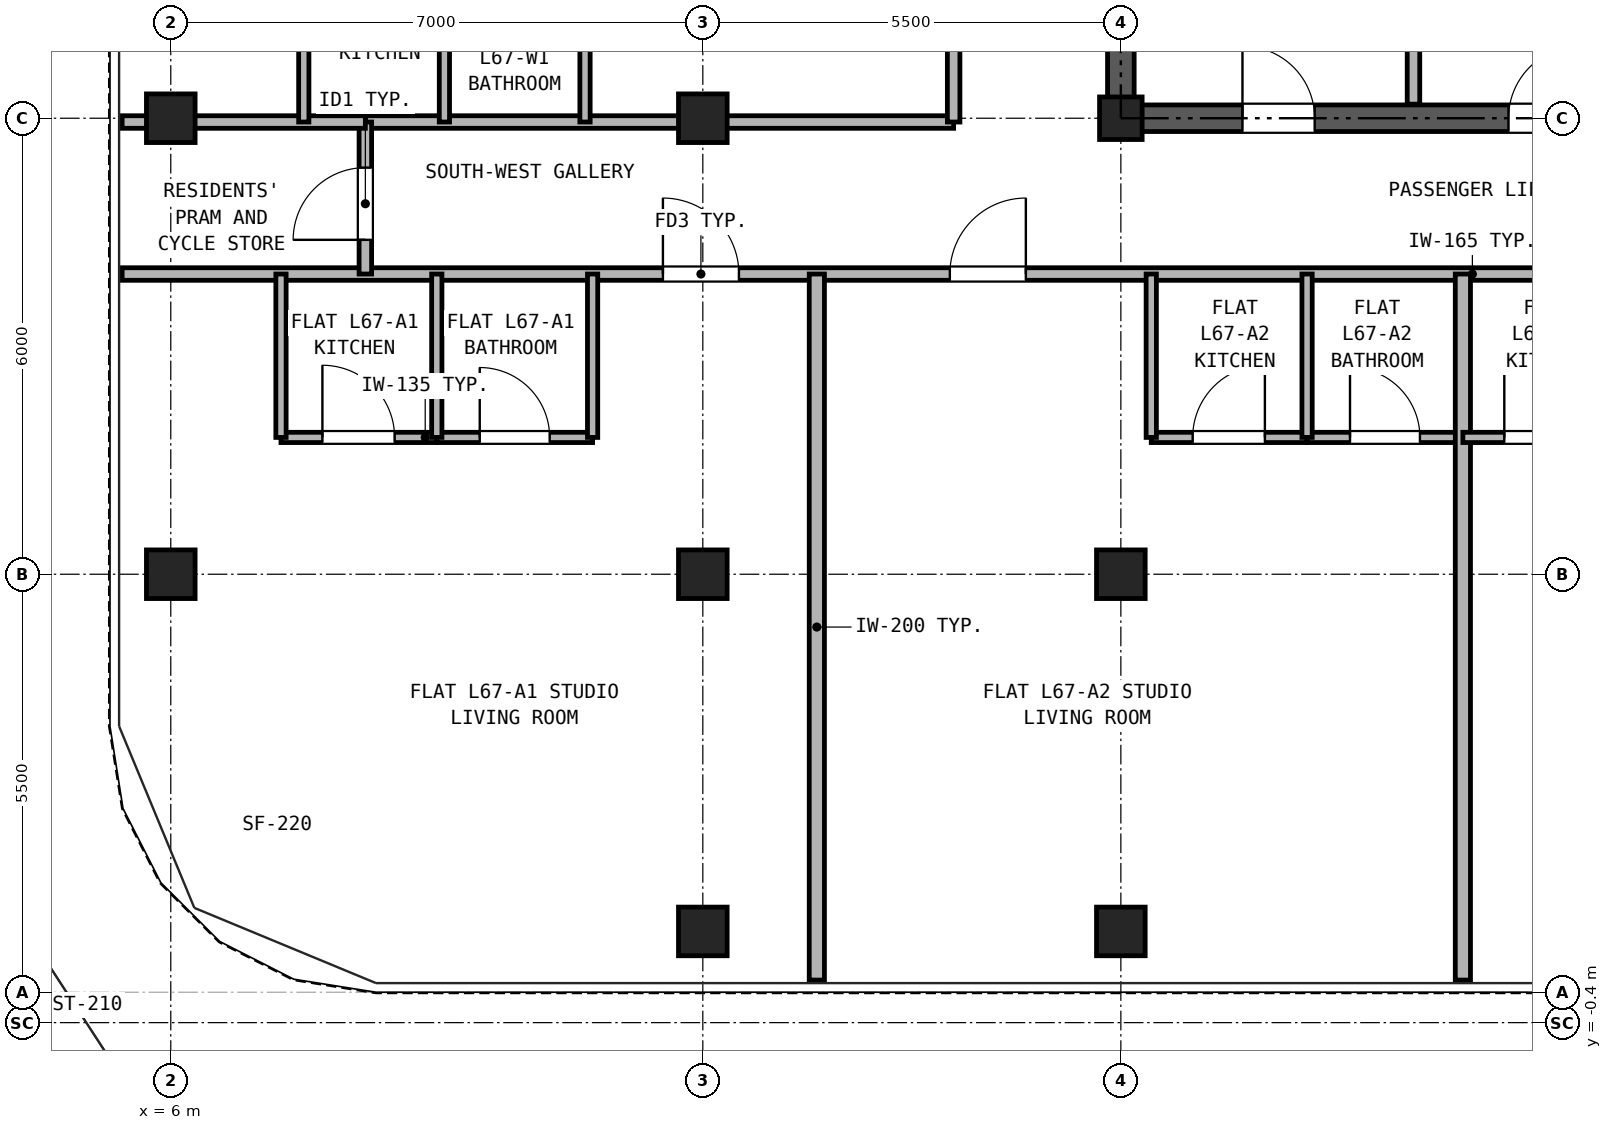
"""IFC4 building model, lengths in metres.
Left out: names, types, materials, properties, quantities, classifications, styles, units other than length and angle.
Written with IfcOpenShell. Run it as: python <this file> out.ifc"""

import sys

from ifc_helpers import new_model, si_unit, direction, frame, frame_2d, origin, origin_2d, place, context, subcontext, project, spatial, rectangle, hollow_rectangle, extrude, source, transform, mapped, element, fill, save


model = new_model("IFC4")
c1 = context("Model", 3, precision=1e-05, world=origin(), true_north=direction((0.0, 1.0)))
c2 = subcontext(c1, "Body", "Model", "MODEL_VIEW")
j1 = project(units=[si_unit("LENGTHUNIT", "METRE"), si_unit("PLANEANGLEUNIT", "RADIAN")], contexts=[c1])
p1 = place(None, origin())
s1 = spatial("IfcSite", under=j1, at=p1, CompositionType="ELEMENT")
p2 = place(p1, origin())
s2 = spatial("IfcBuilding", under=s1, at=p2, CompositionType="ELEMENT")
p3 = place(p2, frame((0.0, 0.0, 236.1)))
s3 = spatial("IfcBuildingStorey", under=s2, at=p3, CompositionType="ELEMENT", Elevation=236.1)
m1 = source(origin(), c2, "Body", "SweptSolid", [
    extrude(hollow_rectangle(XDim=0.64, YDim=0.64, WallThickness=0.035, at=origin_2d()), origin(), (0.0, 0.0, 1.0), 2.98),
])
for number, where, z_axis, x_axis in (
    (1, (13.0, 0.8, 0.0), (0.0, 0.0, 1.0), (1.0, 0.0, 0.0)),
    (2, (18.5, 0.8, 0.0), (0.0, 0.0, 1.0), (1.0, 0.0, 0.0)),
    (3, (6.0, 5.5, 0.0), (0.0, 0.0, 1.0), (1.0, 0.0, 0.0)),
    (4, (6.0, 11.5, 0.0), (0.0, 0.0, 1.0), (1.0, 0.0, 0.0)),
    (5, (13.0, 5.5, 0.0), (0.0, 0.0, 1.0), (1.0, 0.0, 0.0)),
    (6, (13.0, 11.5, 0.0), (0.0, 0.0, 1.0), (1.0, 0.0, 0.0)),
    (7, (18.5, 5.5, 0.0), (0.0, 0.0, 1.0), (1.0, 0.0, 0.0)),
):
    element("IfcColumn", number, at=place(p3, frame(where, z_axis=z_axis, x_axis=x_axis)), inside=s3, PredefinedType="COLUMN", context=c2, shape_type="MappedRepresentation", body=[
        mapped(m1, transform((0.0, 0.0, 0.0), x_axis=(1.0, 0.0, 0.0), y_axis=(0.0, 1.0, 0.0), z_axis=(0.0, 0.0, 1.0), scale=1.0)),
    ])
m2 = source(origin(), c2, "Body", "SweptSolid", [
    extrude(hollow_rectangle(XDim=0.56, YDim=0.56, WallThickness=0.03, at=origin_2d()), origin(), (0.0, 0.0, 1.0), 2.98),
])
p4 = place(p3, frame((18.5, 11.5, 0.0), z_axis=(0.0, 0.0, 1.0), x_axis=(1.0, 0.0, 0.0)))
e8 = element("IfcColumn", 8, at=p4, inside=s3, PredefinedType="COLUMN", context=c2, shape_type="MappedRepresentation", body=[
    mapped(m2, transform((0.0, 0.0, 0.0), x_axis=(1.0, 0.0, 0.0), y_axis=(0.0, 1.0, 0.0), z_axis=(0.0, 0.0, 1.0), scale=1.0)),
])
p5 = place(p3, frame((18.325, 11.5, 0.0), z_axis=(0.0, 0.0, 1.0), x_axis=(1.0, 0.0, 0.0)))
e9 = element("IfcWall", 9, at=p5, inside=s3, PredefinedType="SHEAR", context=c2, shape_type="SweptSolid", body=[
    extrude(rectangle(XDim=10.35, YDim=0.35, at=frame_2d((5.175, 0.0))), origin(), (0.0, 0.0, 1.0), 2.98),
])
p6 = place(p5, frame((1.775, 0.0, 0.0)))
e10 = element("IfcOpeningElement", 10, at=p6, cuts=e9, PredefinedType="OPENING", context=c2, shape_type="SweptSolid", body=[
    extrude(rectangle(XDim=0.95, YDim=2.15, at=frame_2d((0.475, 1.075))), frame((0.0, 0.185, 0.0), z_axis=(0.0, -1.0, 0.0), x_axis=(1.0, 0.0, 0.0)), (0.0, 0.0, 1.0), 0.37),
])
p7 = place(p5, frame((5.275, 0.0, 0.0)))
e11 = element("IfcOpeningElement", 11, at=p7, cuts=e9, PredefinedType="OPENING", context=c2, shape_type="SweptSolid", body=[
    extrude(rectangle(XDim=0.95, YDim=2.15, at=frame_2d((0.475, 1.075))), frame((0.0, 0.185, 0.0), z_axis=(0.0, -1.0, 0.0), x_axis=(1.0, 0.0, 0.0)), (0.0, 0.0, 1.0), 0.37),
])
p8 = place(p5, frame((8.175, 0.0, 0.0)))
e12 = element("IfcOpeningElement", 12, at=p8, cuts=e9, PredefinedType="OPENING", context=c2, shape_type="SweptSolid", body=[
    extrude(rectangle(XDim=1.1, YDim=2.25, at=frame_2d((0.55, 1.125))), frame((0.0, 0.185, 0.0), z_axis=(0.0, -1.0, 0.0), x_axis=(1.0, 0.0, 0.0)), (0.0, 0.0, 1.0), 0.37),
])
p9 = place(p3, frame((18.5, 11.675, 0.0), z_axis=(0.0, 0.0, 1.0), x_axis=(0.0, 1.0, 0.0)))
e13 = element("IfcWall", 13, at=p9, inside=s3, PredefinedType="SHEAR", context=c2, shape_type="SweptSolid", body=[
    extrude(rectangle(XDim=16.9, YDim=0.35, at=frame_2d((8.45, 0.0))), origin(), (0.0, 0.0, 1.0), 2.98),
])
p10 = place(p9, frame((7.475, 0.0, 0.0)))
e14 = element("IfcOpeningElement", 14, at=p10, cuts=e13, PredefinedType="OPENING", context=c2, shape_type="SweptSolid", body=[
    extrude(rectangle(XDim=1.15, YDim=2.2, at=frame_2d((0.575, 1.1))), frame((0.0, 0.185, 0.0), z_axis=(0.0, -1.0, 0.0), x_axis=(1.0, 0.0, 0.0)), (0.0, 0.0, 1.0), 0.37),
])
p11 = place(p3, frame((22.35, 11.685, 0.0), z_axis=(0.0, 0.0, 1.0), x_axis=(0.0, 1.0, 0.0)))
e15 = element("IfcWall", 15, at=p11, inside=s3, PredefinedType="PARTITIONING", context=c2, shape_type="SweptSolid", body=[
    extrude(rectangle(XDim=3.315, YDim=0.165, at=frame_2d((1.657, 0.0))), origin(), (0.0, 0.0, 1.0), 2.98),
])
p12 = place(p3, frame((5.36, 9.45, 0.0), z_axis=(0.0, 0.0, 1.0), x_axis=(1.0, 0.0, 0.0)))
e16 = element("IfcWall", 16, at=p12, inside=s3, PredefinedType="PARTITIONING", context=c2, shape_type="SweptSolid", body=[
    extrude(rectangle(XDim=36.28, YDim=0.165, at=frame_2d((18.14, 0.0))), origin(), (0.0, 0.0, 1.0), 2.98),
])
p13 = place(p12, frame((7.115, 0.0, 0.0)))
e17 = element("IfcOpeningElement", 17, at=p13, cuts=e16, PredefinedType="OPENING", context=c2, shape_type="SweptSolid", body=[
    extrude(rectangle(XDim=1.0, YDim=2.15, at=frame_2d((0.5, 1.075))), frame((0.0, 0.093, 0.0), z_axis=(0.0, -1.0, 0.0), x_axis=(1.0, 0.0, 0.0)), (0.0, 0.0, 1.0), 0.185),
])
p14 = place(p12, frame((10.89, 0.0, 0.0)))
e18 = element("IfcOpeningElement", 18, at=p14, cuts=e16, PredefinedType="OPENING", context=c2, shape_type="SweptSolid", body=[
    extrude(rectangle(XDim=1.0, YDim=2.15, at=frame_2d((0.5, 1.075))), frame((0.0, 0.093, 0.0), z_axis=(0.0, -1.0, 0.0), x_axis=(1.0, 0.0, 0.0)), (0.0, 0.0, 1.0), 0.185),
])
p15 = place(p12, frame((23.64, 0.0, 0.0)))
e19 = element("IfcOpeningElement", 19, at=p15, cuts=e16, PredefinedType="OPENING", context=c2, shape_type="SweptSolid", body=[
    extrude(rectangle(XDim=1.0, YDim=2.15, at=frame_2d((0.5, 1.075))), frame((0.0, 0.093, 0.0), z_axis=(0.0, -1.0, 0.0), x_axis=(1.0, 0.0, 0.0)), (0.0, 0.0, 1.0), 0.185),
])
p16 = place(p12, frame((27.915, 0.0, 0.0)))
e20 = element("IfcOpeningElement", 20, at=p16, cuts=e16, PredefinedType="OPENING", context=c2, shape_type="SweptSolid", body=[
    extrude(rectangle(XDim=1.0, YDim=2.15, at=frame_2d((0.5, 1.075))), frame((0.0, 0.093, 0.0), z_axis=(0.0, -1.0, 0.0), x_axis=(1.0, 0.0, 0.0)), (0.0, 0.0, 1.0), 0.185),
])
p17 = place(p3, frame((8.56, 11.45, 0.0), z_axis=(0.0, 0.0, 1.0), x_axis=(1.0, 0.0, 0.0)))
e21 = element("IfcWall", 21, at=p17, inside=s3, PredefinedType="PARTITIONING", context=c2, shape_type="SweptSolid", body=[
    extrude(rectangle(XDim=7.74, YDim=0.165, at=frame_2d((3.87, 0.0))), origin(), (0.0, 0.0, 1.0), 2.428),
])
p18 = place(p3, frame((8.56, 9.45, 0.0), z_axis=(0.0, 0.0, 1.0), x_axis=(0.0, 1.0, 0.0)))
e22 = element("IfcWall", 22, at=p18, inside=s3, PredefinedType="PARTITIONING", context=c2, shape_type="SweptSolid", body=[
    extrude(rectangle(XDim=2.0, YDim=0.165, at=frame_2d((1.0, 0.0))), origin(), (0.0, 0.0, 1.0), 2.98),
])
p19 = place(p18, frame((0.45, 0.0, 0.0)))
e23 = element("IfcOpeningElement", 23, at=p19, cuts=e22, PredefinedType="OPENING", context=c2, shape_type="SweptSolid", body=[
    extrude(rectangle(XDim=0.95, YDim=2.15, at=frame_2d((0.475, 1.075))), frame((0.0, 0.093, 0.0), z_axis=(0.0, -1.0, 0.0), x_axis=(1.0, 0.0, 0.0)), (0.0, 0.0, 1.0), 0.185),
])
p20 = place(p3, frame((16.3, 11.45, 0.0), z_axis=(0.0, 0.0, 1.0), x_axis=(0.0, 1.0, 0.0)))
e24 = element("IfcWall", 24, at=p20, inside=s3, PredefinedType="PARTITIONING", context=c2, shape_type="SweptSolid", body=[
    extrude(rectangle(XDim=23.69, YDim=0.165, at=frame_2d((11.845, 0.0))), origin(), (0.0, 0.0, 1.0), 2.98),
])
p21 = place(p20, frame((3.275, 0.0, 0.0)))
e25 = element("IfcOpeningElement", 25, at=p21, cuts=e24, PredefinedType="OPENING", context=c2, shape_type="SweptSolid", body=[
    extrude(rectangle(XDim=1.0, YDim=2.15, at=frame_2d((0.5, 1.075))), frame((0.0, 0.093, 0.0), z_axis=(0.0, -1.0, 0.0), x_axis=(1.0, 0.0, 0.0)), (0.0, 0.0, 1.0), 0.185),
])
p22 = place(p20, frame((11.15, 0.0, 0.0)))
e26 = element("IfcOpeningElement", 26, at=p22, cuts=e24, PredefinedType="OPENING", context=c2, shape_type="SweptSolid", body=[
    extrude(rectangle(XDim=1.0, YDim=2.15, at=frame_2d((0.5, 1.075))), frame((0.0, 0.093, 0.0), z_axis=(0.0, -1.0, 0.0), x_axis=(1.0, 0.0, 0.0)), (0.0, 0.0, 1.0), 0.185),
])
p23 = place(p20, frame((16.925, 0.0, 0.0)))
e27 = element("IfcOpeningElement", 27, at=p23, cuts=e24, PredefinedType="OPENING", context=c2, shape_type="SweptSolid", body=[
    extrude(rectangle(XDim=1.0, YDim=2.15, at=frame_2d((0.5, 1.075))), frame((0.0, 0.093, 0.0), z_axis=(0.0, -1.0, 0.0), x_axis=(1.0, 0.0, 0.0)), (0.0, 0.0, 1.0), 0.185),
])
p24 = place(p3, frame((7.45, 7.3, 0.0), z_axis=(0.0, 0.0, 1.0), x_axis=(1.0, 0.0, 0.0)))
e28 = element("IfcWall", 28, at=p24, inside=s3, PredefinedType="PARTITIONING", context=c2, shape_type="SweptSolid", body=[
    extrude(rectangle(XDim=2.05, YDim=0.135, at=frame_2d((1.025, 0.0))), origin(), (0.0, 0.0, 1.0), 2.98),
])
p25 = place(p24, frame((0.545, 0.0, 0.0)))
e29 = element("IfcOpeningElement", 29, at=p25, cuts=e28, PredefinedType="OPENING", context=c2, shape_type="SweptSolid", body=[
    extrude(rectangle(XDim=0.95, YDim=2.15, at=frame_2d((0.475, 1.075))), frame((0.0, 0.077, 0.0), z_axis=(0.0, -1.0, 0.0), x_axis=(1.0, 0.0, 0.0)), (0.0, 0.0, 1.0), 0.155),
])
p26 = place(p3, frame((9.5, 7.3, 0.0), z_axis=(0.0, 0.0, 1.0), x_axis=(1.0, 0.0, 0.0)))
e30 = element("IfcWall", 30, at=p26, inside=s3, PredefinedType="PARTITIONING", context=c2, shape_type="SweptSolid", body=[
    extrude(rectangle(XDim=2.05, YDim=0.135, at=frame_2d((1.025, 0.0))), origin(), (0.0, 0.0, 1.0), 2.98),
])
p27 = place(p26, frame((0.565, 0.0, 0.0)))
e31 = element("IfcOpeningElement", 31, at=p27, cuts=e30, PredefinedType="OPENING", context=c2, shape_type="SweptSolid", body=[
    extrude(rectangle(XDim=0.92, YDim=2.1, at=frame_2d((0.46, 1.05))), frame((0.0, 0.077, 0.0), z_axis=(0.0, -1.0, 0.0), x_axis=(1.0, 0.0, 0.0)), (0.0, 0.0, 1.0), 0.155),
])
for number, where, z_axis, x_axis in (
    (32, (7.45, 7.3, 0.0), (0.0, 0.0, 1.0), (0.0, 1.0, 0.0)),
    (33, (9.5, 7.3, 0.0), (0.0, 0.0, 1.0), (0.0, 1.0, 0.0)),
    (34, (11.55, 7.3, 0.0), (0.0, 0.0, 1.0), (0.0, 1.0, 0.0)),
):
    element("IfcWall", number, at=place(p3, frame(where, z_axis=z_axis, x_axis=x_axis)), inside=s3, PredefinedType="PARTITIONING", context=c2, shape_type="SweptSolid", body=[
        extrude(rectangle(XDim=2.15, YDim=0.135, at=frame_2d((1.075, 0.0))), origin(), (0.0, 0.0, 1.0), 2.98),
    ])
p28 = place(p3, frame((14.5, 0.16, 0.0), z_axis=(0.0, 0.0, 1.0), x_axis=(0.0, 1.0, 0.0)))
e35 = element("IfcWall", 35, at=p28, inside=s3, PredefinedType="PARTITIONING", context=c2, shape_type="SweptSolid", body=[
    extrude(rectangle(XDim=9.29, YDim=0.2, at=frame_2d((4.645, 0.0))), origin(), (0.0, 0.0, 1.0), 2.98),
])
p29 = place(p3, frame((18.9, 7.3, 0.0), z_axis=(0.0, 0.0, 1.0), x_axis=(1.0, 0.0, 0.0)))
e36 = element("IfcWall", 36, at=p29, inside=s3, PredefinedType="PARTITIONING", context=c2, shape_type="SweptSolid", body=[
    extrude(rectangle(XDim=2.05, YDim=0.135, at=frame_2d((1.025, 0.0))), origin(), (0.0, 0.0, 1.0), 2.98),
])
p30 = place(p29, frame((0.545, 0.0, 0.0)))
e37 = element("IfcOpeningElement", 37, at=p30, cuts=e36, PredefinedType="OPENING", context=c2, shape_type="SweptSolid", body=[
    extrude(rectangle(XDim=0.95, YDim=2.15, at=frame_2d((0.475, 1.075))), frame((0.0, 0.077, 0.0), z_axis=(0.0, -1.0, 0.0), x_axis=(1.0, 0.0, 0.0)), (0.0, 0.0, 1.0), 0.155),
])
p31 = place(p3, frame((20.95, 7.3, 0.0), z_axis=(0.0, 0.0, 1.0), x_axis=(1.0, 0.0, 0.0)))
e38 = element("IfcWall", 38, at=p31, inside=s3, PredefinedType="PARTITIONING", context=c2, shape_type="SweptSolid", body=[
    extrude(rectangle(XDim=2.05, YDim=0.135, at=frame_2d((1.025, 0.0))), origin(), (0.0, 0.0, 1.0), 2.98),
])
p32 = place(p31, frame((0.565, 0.0, 0.0)))
e39 = element("IfcOpeningElement", 39, at=p32, cuts=e38, PredefinedType="OPENING", context=c2, shape_type="SweptSolid", body=[
    extrude(rectangle(XDim=0.92, YDim=2.1, at=frame_2d((0.46, 1.05))), frame((0.0, 0.077, 0.0), z_axis=(0.0, -1.0, 0.0), x_axis=(1.0, 0.0, 0.0)), (0.0, 0.0, 1.0), 0.155),
])
for number, where, z_axis, x_axis in (
    (40, (18.9, 7.3, 0.0), (0.0, 0.0, 1.0), (0.0, 1.0, 0.0)),
    (41, (20.95, 7.3, 0.0), (0.0, 0.0, 1.0), (0.0, 1.0, 0.0)),
):
    element("IfcWall", number, at=place(p3, frame(where, z_axis=z_axis, x_axis=x_axis)), inside=s3, PredefinedType="PARTITIONING", context=c2, shape_type="SweptSolid", body=[
        extrude(rectangle(XDim=2.15, YDim=0.135, at=frame_2d((1.075, 0.0))), origin(), (0.0, 0.0, 1.0), 2.98),
    ])
p33 = place(p3, frame((23.0, 0.16, 0.0), z_axis=(0.0, 0.0, 1.0), x_axis=(0.0, 1.0, 0.0)))
e42 = element("IfcWall", 42, at=p33, inside=s3, PredefinedType="PARTITIONING", context=c2, shape_type="SweptSolid", body=[
    extrude(rectangle(XDim=9.29, YDim=0.2, at=frame_2d((4.645, 0.0))), origin(), (0.0, 0.0, 1.0), 2.98),
])
p34 = place(p3, frame((23.0, 7.3, 0.0), z_axis=(0.0, 0.0, 1.0), x_axis=(1.0, 0.0, 0.0)))
e43 = element("IfcWall", 43, at=p34, inside=s3, PredefinedType="PARTITIONING", context=c2, shape_type="SweptSolid", body=[
    extrude(rectangle(XDim=2.05, YDim=0.135, at=frame_2d((1.025, 0.0))), origin(), (0.0, 0.0, 1.0), 2.98),
])
p35 = place(p34, frame((0.545, 0.0, 0.0)))
e44 = element("IfcOpeningElement", 44, at=p35, cuts=e43, PredefinedType="OPENING", context=c2, shape_type="SweptSolid", body=[
    extrude(rectangle(XDim=0.95, YDim=2.15, at=frame_2d((0.475, 1.075))), frame((0.0, 0.077, 0.0), z_axis=(0.0, -1.0, 0.0), x_axis=(1.0, 0.0, 0.0)), (0.0, 0.0, 1.0), 0.155),
])
p36 = place(p3, frame((5.36, 11.45, 0.0), z_axis=(0.0, 0.0, 1.0), x_axis=(1.0, 0.0, 0.0)))
e45 = element("IfcWall", 45, at=p36, inside=s3, PredefinedType="PARTITIONING", context=c2, shape_type="SweptSolid", body=[
    extrude(rectangle(XDim=3.2, YDim=0.165, at=frame_2d((1.6, 0.0))), origin(), (0.0, 0.0, 1.0), 2.428),
])
for number, where, z_axis, x_axis in (
    (46, (7.75, 11.45, 0.0), (0.0, 0.0, 1.0), (0.0, 1.0, 0.0)),
    (47, (9.6, 11.45, 0.0), (0.0, 0.0, 1.0), (0.0, 1.0, 0.0)),
    (48, (11.45, 11.45, 0.0), (0.0, 0.0, 1.0), (0.0, 1.0, 0.0)),
):
    element("IfcWall", number, at=place(p3, frame(where, z_axis=z_axis, x_axis=x_axis)), inside=s3, PredefinedType="PARTITIONING", context=c2, shape_type="SweptSolid", body=[
        extrude(rectangle(XDim=2.15, YDim=0.135, at=frame_2d((1.075, 0.0))), origin(), (0.0, 0.0, 1.0), 2.98),
    ])
p37 = place(p6, frame((0.95, 0.0, 0.0), z_axis=(0.0, 0.0, 1.0), x_axis=(-1.0, 0.0, 0.0)))
e49 = element("IfcDoor", 49, at=p37, inside=s3, OperationType="SINGLE_SWING_LEFT", PredefinedType="DOOR", context=c2, shape_type="SweptSolid", body=[
    extrude(rectangle(XDim=0.95, YDim=2.15, at=frame_2d((0.475, 1.075))), frame((0.0, 0.025, 0.0), z_axis=(0.0, -1.0, 0.0), x_axis=(1.0, 0.0, 0.0)), (0.0, 0.0, 1.0), 0.05),
])
fill(e10, e49)
p38 = place(p7, frame((0.95, 0.0, 0.0), z_axis=(0.0, 0.0, 1.0), x_axis=(-1.0, 0.0, 0.0)))
e50 = element("IfcDoor", 50, at=p38, inside=s3, OperationType="SINGLE_SWING_RIGHT", PredefinedType="DOOR", context=c2, shape_type="SweptSolid", body=[
    extrude(rectangle(XDim=0.95, YDim=2.15, at=frame_2d((0.475, 1.075))), frame((0.0, 0.025, 0.0), z_axis=(0.0, -1.0, 0.0), x_axis=(1.0, 0.0, 0.0)), (0.0, 0.0, 1.0), 0.05),
])
fill(e11, e50)
p39 = place(p25, origin())
e51 = element("IfcDoor", 51, at=p39, inside=s3, OperationType="SINGLE_SWING_LEFT", PredefinedType="DOOR", context=c2, shape_type="SweptSolid", body=[
    extrude(rectangle(XDim=0.95, YDim=2.15, at=frame_2d((0.475, 1.075))), frame((0.0, 0.025, 0.0), z_axis=(0.0, -1.0, 0.0), x_axis=(1.0, 0.0, 0.0)), (0.0, 0.0, 1.0), 0.05),
])
fill(e29, e51)
p40 = place(p27, origin())
e52 = element("IfcDoor", 52, at=p40, inside=s3, OperationType="SINGLE_SWING_LEFT", PredefinedType="DOOR", context=c2, shape_type="SweptSolid", body=[
    extrude(rectangle(XDim=0.92, YDim=2.1, at=frame_2d((0.46, 1.05))), frame((0.0, 0.025, 0.0), z_axis=(0.0, -1.0, 0.0), x_axis=(1.0, 0.0, 0.0)), (0.0, 0.0, 1.0), 0.05),
])
fill(e31, e52)
p41 = place(p13, frame((1.0, 0.0, 0.0), z_axis=(0.0, 0.0, 1.0), x_axis=(-1.0, 0.0, 0.0)))
e53 = element("IfcDoor", 53, at=p41, inside=s3, OperationType="SINGLE_SWING_LEFT", PredefinedType="DOOR", context=c2, shape_type="SweptSolid", body=[
    extrude(rectangle(XDim=1.0, YDim=2.15, at=frame_2d((0.5, 1.075))), frame((0.0, 0.025, 0.0), z_axis=(0.0, -1.0, 0.0), x_axis=(1.0, 0.0, 0.0)), (0.0, 0.0, 1.0), 0.05),
])
fill(e17, e53)
p42 = place(p30, origin())
e54 = element("IfcDoor", 54, at=p42, inside=s3, OperationType="SINGLE_SWING_RIGHT", PredefinedType="DOOR", context=c2, shape_type="SweptSolid", body=[
    extrude(rectangle(XDim=0.95, YDim=2.15, at=frame_2d((0.475, 1.075))), frame((0.0, 0.025, 0.0), z_axis=(0.0, -1.0, 0.0), x_axis=(1.0, 0.0, 0.0)), (0.0, 0.0, 1.0), 0.05),
])
fill(e37, e54)
p43 = place(p32, origin())
e55 = element("IfcDoor", 55, at=p43, inside=s3, OperationType="SINGLE_SWING_LEFT", PredefinedType="DOOR", context=c2, shape_type="SweptSolid", body=[
    extrude(rectangle(XDim=0.92, YDim=2.1, at=frame_2d((0.46, 1.05))), frame((0.0, 0.025, 0.0), z_axis=(0.0, -1.0, 0.0), x_axis=(1.0, 0.0, 0.0)), (0.0, 0.0, 1.0), 0.05),
])
fill(e39, e55)
p44 = place(p14, frame((1.0, 0.0, 0.0), z_axis=(0.0, 0.0, 1.0), x_axis=(-1.0, 0.0, 0.0)))
e56 = element("IfcDoor", 56, at=p44, inside=s3, OperationType="SINGLE_SWING_RIGHT", PredefinedType="DOOR", context=c2, shape_type="SweptSolid", body=[
    extrude(rectangle(XDim=1.0, YDim=2.15, at=frame_2d((0.5, 1.075))), frame((0.0, 0.025, 0.0), z_axis=(0.0, -1.0, 0.0), x_axis=(1.0, 0.0, 0.0)), (0.0, 0.0, 1.0), 0.05),
])
fill(e18, e56)
p45 = place(p35, origin())
e57 = element("IfcDoor", 57, at=p45, inside=s3, OperationType="SINGLE_SWING_LEFT", PredefinedType="DOOR", context=c2, shape_type="SweptSolid", body=[
    extrude(rectangle(XDim=0.95, YDim=2.15, at=frame_2d((0.475, 1.075))), frame((0.0, 0.025, 0.0), z_axis=(0.0, -1.0, 0.0), x_axis=(1.0, 0.0, 0.0)), (0.0, 0.0, 1.0), 0.05),
])
fill(e44, e57)
p46 = place(p19, frame((0.95, 0.0, 0.0), z_axis=(0.0, 0.0, 1.0), x_axis=(-1.0, 0.0, 0.0)))
e58 = element("IfcDoor", 58, at=p46, inside=s3, OperationType="SINGLE_SWING_LEFT", PredefinedType="DOOR", context=c2, shape_type="SweptSolid", body=[
    extrude(rectangle(XDim=0.95, YDim=2.15, at=frame_2d((0.475, 1.075))), frame((0.0, 0.025, 0.0), z_axis=(0.0, -1.0, 0.0), x_axis=(1.0, 0.0, 0.0)), (0.0, 0.0, 1.0), 0.05),
])
fill(e23, e58)
save(model, sys.argv[1])
